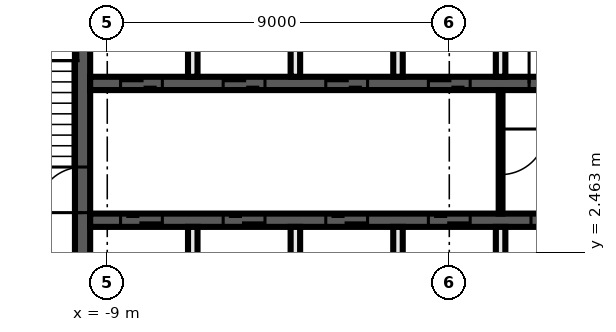
"""IFC4 building model, lengths in metres.
Left out: names, types, materials, properties, quantities, classifications, styles, units other than length and angle.
Written with IfcOpenShell. Run it as: python <this file> out.ifc"""

import sys

from ifc_helpers import new_model, si_unit, direction, frame, frame_2d, origin, place, context, subcontext, project, spatial, rectangle, extrude, element, fill, save


model = new_model("IFC4")
c1 = context("Model", 3, precision=1e-05, world=origin(), true_north=direction((0.0, 1.0)))
c2 = subcontext(c1, "Body", "Model", "MODEL_VIEW")
j1 = project(units=[si_unit("LENGTHUNIT", "METRE"), si_unit("PLANEANGLEUNIT", "RADIAN")], contexts=[c1])
p1 = place(None, origin())
s1 = spatial("IfcSite", under=j1, at=p1, CompositionType="ELEMENT")
p2 = place(p1, origin())
s2 = spatial("IfcBuilding", under=s1, at=p2, CompositionType="ELEMENT")
p3 = place(p2, frame((0.0, 0.0, 77.3)))
s3 = spatial("IfcBuildingStorey", under=s2, at=p3, CompositionType="ELEMENT", Elevation=77.3)
p4 = place(p3, frame((-9.65, 2.3, 0.0), z_axis=(0.0, 0.0, 1.0), x_axis=(0.0, 1.0, 0.0)))
e1 = element("IfcWall", 1, at=p4, inside=s3, PredefinedType="SHEAR", context=c2, shape_type="SweptSolid", body=[
    extrude(rectangle(XDim=7.5, YDim=0.4, at=frame_2d((3.75, 0.0))), origin(), (0.0, 0.0, 1.0), 3.3),
])
p5 = place(p4, frame((1.2, 0.0, 0.0)))
e2 = element("IfcOpeningElement", 2, at=p5, cuts=e1, PredefinedType="OPENING", context=c2, shape_type="SweptSolid", body=[
    extrude(rectangle(XDim=1.2, YDim=2.1, at=frame_2d((0.6, 1.05))), frame((0.0, 0.21, 0.0), z_axis=(0.0, -1.0, 0.0), x_axis=(1.0, 0.0, 0.0)), (0.0, 0.0, 1.0), 0.42),
])
p6 = place(p3, frame((-9.45, 6.9, 0.0), z_axis=(0.0, 0.0, 1.0), x_axis=(1.0, 0.0, 0.0)))
e3 = element("IfcWall", 3, at=p6, inside=s3, PredefinedType="SHEAR", context=c2, shape_type="SweptSolid", body=[
    extrude(rectangle(XDim=18.9, YDim=0.35, at=frame_2d((9.45, 0.0))), origin(), (0.0, 0.0, 1.0), 3.3),
])
p7 = place(p6, frame((0.8, 0.0, 0.0)))
e4 = element("IfcOpeningElement", 4, at=p7, cuts=e3, PredefinedType="OPENING", context=c2, shape_type="SweptSolid", body=[
    extrude(rectangle(XDim=1.1, YDim=2.1, at=frame_2d((0.55, 1.05))), frame((0.0, 0.185, 0.0), z_axis=(0.0, -1.0, 0.0), x_axis=(1.0, 0.0, 0.0)), (0.0, 0.0, 1.0), 0.37),
])
p8 = place(p6, frame((3.5, 0.0, 0.0)))
e5 = element("IfcOpeningElement", 5, at=p8, cuts=e3, PredefinedType="OPENING", context=c2, shape_type="SweptSolid", body=[
    extrude(rectangle(XDim=1.1, YDim=2.1, at=frame_2d((0.55, 1.05))), frame((0.0, 0.185, 0.0), z_axis=(0.0, -1.0, 0.0), x_axis=(1.0, 0.0, 0.0)), (0.0, 0.0, 1.0), 0.37),
])
p9 = place(p6, frame((6.2, 0.0, 0.0)))
e6 = element("IfcOpeningElement", 6, at=p9, cuts=e3, PredefinedType="OPENING", context=c2, shape_type="SweptSolid", body=[
    extrude(rectangle(XDim=1.1, YDim=2.1, at=frame_2d((0.55, 1.05))), frame((0.0, 0.185, 0.0), z_axis=(0.0, -1.0, 0.0), x_axis=(1.0, 0.0, 0.0)), (0.0, 0.0, 1.0), 0.37),
])
p10 = place(p6, frame((8.9, 0.0, 0.0)))
e7 = element("IfcOpeningElement", 7, at=p10, cuts=e3, PredefinedType="OPENING", context=c2, shape_type="SweptSolid", body=[
    extrude(rectangle(XDim=1.1, YDim=2.1, at=frame_2d((0.55, 1.05))), frame((0.0, 0.185, 0.0), z_axis=(0.0, -1.0, 0.0), x_axis=(1.0, 0.0, 0.0)), (0.0, 0.0, 1.0), 0.37),
])
p11 = place(p6, frame((11.55, 0.0, 0.0)))
e8 = element("IfcOpeningElement", 8, at=p11, cuts=e3, PredefinedType="OPENING", context=c2, shape_type="SweptSolid", body=[
    extrude(rectangle(XDim=1.2, YDim=2.1, at=frame_2d((0.6, 1.05))), frame((0.0, 0.185, 0.0), z_axis=(0.0, -1.0, 0.0), x_axis=(1.0, 0.0, 0.0)), (0.0, 0.0, 1.0), 0.37),
])
p12 = place(p6, frame((14.3, 0.0, 0.0)))
e9 = element("IfcOpeningElement", 9, at=p12, cuts=e3, PredefinedType="OPENING", context=c2, shape_type="SweptSolid", body=[
    extrude(rectangle(XDim=1.1, YDim=2.1, at=frame_2d((0.55, 1.05))), frame((0.0, 0.185, 0.0), z_axis=(0.0, -1.0, 0.0), x_axis=(1.0, 0.0, 0.0)), (0.0, 0.0, 1.0), 0.37),
])
p13 = place(p6, frame((17.0, 0.0, 0.0)))
e10 = element("IfcOpeningElement", 10, at=p13, cuts=e3, PredefinedType="OPENING", context=c2, shape_type="SweptSolid", body=[
    extrude(rectangle(XDim=1.1, YDim=2.1, at=frame_2d((0.55, 1.05))), frame((0.0, 0.185, 0.0), z_axis=(0.0, -1.0, 0.0), x_axis=(1.0, 0.0, 0.0)), (0.0, 0.0, 1.0), 0.37),
])
p14 = place(p3, frame((9.45, 3.3, 0.0), z_axis=(0.0, 0.0, 1.0), x_axis=(-1.0, 0.0, 0.0)))
e11 = element("IfcWall", 11, at=p14, inside=s3, PredefinedType="SHEAR", context=c2, shape_type="SweptSolid", body=[
    extrude(rectangle(XDim=18.9, YDim=0.35, at=frame_2d((9.45, 0.0))), origin(), (0.0, 0.0, 1.0), 3.3),
])
p15 = place(p14, frame((17.0, 0.0, 0.0)))
e12 = element("IfcOpeningElement", 12, at=p15, cuts=e11, PredefinedType="OPENING", context=c2, shape_type="SweptSolid", body=[
    extrude(rectangle(XDim=1.1, YDim=2.1, at=frame_2d((0.55, 1.05))), frame((0.0, 0.185, 0.0), z_axis=(0.0, -1.0, 0.0), x_axis=(1.0, 0.0, 0.0)), (0.0, 0.0, 1.0), 0.37),
])
p16 = place(p14, frame((14.3, 0.0, 0.0)))
e13 = element("IfcOpeningElement", 13, at=p16, cuts=e11, PredefinedType="OPENING", context=c2, shape_type="SweptSolid", body=[
    extrude(rectangle(XDim=1.1, YDim=2.1, at=frame_2d((0.55, 1.05))), frame((0.0, 0.185, 0.0), z_axis=(0.0, -1.0, 0.0), x_axis=(1.0, 0.0, 0.0)), (0.0, 0.0, 1.0), 0.37),
])
p17 = place(p14, frame((11.6, 0.0, 0.0)))
e14 = element("IfcOpeningElement", 14, at=p17, cuts=e11, PredefinedType="OPENING", context=c2, shape_type="SweptSolid", body=[
    extrude(rectangle(XDim=1.1, YDim=2.1, at=frame_2d((0.55, 1.05))), frame((0.0, 0.185, 0.0), z_axis=(0.0, -1.0, 0.0), x_axis=(1.0, 0.0, 0.0)), (0.0, 0.0, 1.0), 0.37),
])
p18 = place(p14, frame((8.9, 0.0, 0.0)))
e15 = element("IfcOpeningElement", 15, at=p18, cuts=e11, PredefinedType="OPENING", context=c2, shape_type="SweptSolid", body=[
    extrude(rectangle(XDim=1.1, YDim=2.1, at=frame_2d((0.55, 1.05))), frame((0.0, 0.185, 0.0), z_axis=(0.0, -1.0, 0.0), x_axis=(1.0, 0.0, 0.0)), (0.0, 0.0, 1.0), 0.37),
])
p19 = place(p14, frame((6.2, 0.0, 0.0)))
e16 = element("IfcOpeningElement", 16, at=p19, cuts=e11, PredefinedType="OPENING", context=c2, shape_type="SweptSolid", body=[
    extrude(rectangle(XDim=1.1, YDim=2.1, at=frame_2d((0.55, 1.05))), frame((0.0, 0.185, 0.0), z_axis=(0.0, -1.0, 0.0), x_axis=(1.0, 0.0, 0.0)), (0.0, 0.0, 1.0), 0.37),
])
p20 = place(p14, frame((3.5, 0.0, 0.0)))
e17 = element("IfcOpeningElement", 17, at=p20, cuts=e11, PredefinedType="OPENING", context=c2, shape_type="SweptSolid", body=[
    extrude(rectangle(XDim=1.1, YDim=2.1, at=frame_2d((0.55, 1.05))), frame((0.0, 0.185, 0.0), z_axis=(0.0, -1.0, 0.0), x_axis=(1.0, 0.0, 0.0)), (0.0, 0.0, 1.0), 0.37),
])
p21 = place(p14, frame((0.9, 0.0, 0.0)))
e18 = element("IfcOpeningElement", 18, at=p21, cuts=e11, PredefinedType="OPENING", context=c2, shape_type="SweptSolid", body=[
    extrude(rectangle(XDim=0.9, YDim=2.1, at=frame_2d((0.45, 1.05))), frame((0.0, 0.185, 0.0), z_axis=(0.0, -1.0, 0.0), x_axis=(1.0, 0.0, 0.0)), (0.0, 0.0, 1.0), 0.37),
])
p22 = place(p3, frame((1.35, 6.725, 0.0), z_axis=(0.0, 0.0, 1.0), x_axis=(0.0, -1.0, 0.0)))
e19 = element("IfcWall", 19, at=p22, inside=s3, PredefinedType="PARTITIONING", context=c2, shape_type="SweptSolid", body=[
    extrude(rectangle(XDim=3.25, YDim=0.1, at=frame_2d((1.625, 0.0))), origin(), (0.0, 0.0, 1.0), 3.3),
])
p23 = place(p22, frame((1.025, 0.0, 0.0)))
e20 = element("IfcOpeningElement", 20, at=p23, cuts=e19, PredefinedType="OPENING", context=c2, shape_type="SweptSolid", body=[
    extrude(rectangle(XDim=1.2, YDim=2.1, at=frame_2d((0.6, 1.05))), frame((0.0, 0.06, 0.0), z_axis=(0.0, -1.0, 0.0), x_axis=(1.0, 0.0, 0.0)), (0.0, 0.0, 1.0), 0.12),
])
for number, where, z_axis, x_axis in (
    (21, (1.35, 0.4, 0.0), (0.0, 0.0, 1.0), (0.0, 1.0, 0.0)),
    (22, (1.35, 7.075, 0.0), (0.0, 0.0, 1.0), (0.0, 1.0, 0.0)),
    (23, (-1.35, 0.4, 0.0), (0.0, 0.0, 1.0), (0.0, 1.0, 0.0)),
    (24, (-1.35, 7.075, 0.0), (0.0, 0.0, 1.0), (0.0, 1.0, 0.0)),
    (25, (-4.05, 0.4, 0.0), (0.0, 0.0, 1.0), (0.0, 1.0, 0.0)),
    (26, (-4.05, 7.075, 0.0), (0.0, 0.0, 1.0), (0.0, 1.0, 0.0)),
    (27, (-6.75, 0.4, 0.0), (0.0, 0.0, 1.0), (0.0, 1.0, 0.0)),
    (28, (-6.75, 7.075, 0.0), (0.0, 0.0, 1.0), (0.0, 1.0, 0.0)),
):
    element("IfcWall", number, at=place(p3, frame(where, z_axis=z_axis, x_axis=x_axis)), inside=s3, PredefinedType="SOLIDWALL", context=c2, shape_type="SweptSolid", body=[
        extrude(rectangle(XDim=2.725, YDim=0.25, at=frame_2d((1.363, 0.0))), origin(), (0.0, 0.0, 1.0), 3.3),
    ])
p24 = place(p7, origin())
e29 = element("IfcDoor", 29, at=p24, inside=s3, OperationType="DOUBLE_DOOR_SLIDING", PredefinedType="DOOR", context=c2, shape_type="SweptSolid", body=[
    extrude(rectangle(XDim=1.1, YDim=2.1, at=frame_2d((0.55, 1.05))), frame((0.0, 0.025, 0.0), z_axis=(0.0, -1.0, 0.0), x_axis=(1.0, 0.0, 0.0)), (0.0, 0.0, 1.0), 0.05),
])
fill(e4, e29)
p25 = place(p8, origin())
e30 = element("IfcDoor", 30, at=p25, inside=s3, OperationType="DOUBLE_DOOR_SLIDING", PredefinedType="DOOR", context=c2, shape_type="SweptSolid", body=[
    extrude(rectangle(XDim=1.1, YDim=2.1, at=frame_2d((0.55, 1.05))), frame((0.0, 0.025, 0.0), z_axis=(0.0, -1.0, 0.0), x_axis=(1.0, 0.0, 0.0)), (0.0, 0.0, 1.0), 0.05),
])
fill(e5, e30)
p26 = place(p9, origin())
e31 = element("IfcDoor", 31, at=p26, inside=s3, OperationType="DOUBLE_DOOR_SLIDING", PredefinedType="DOOR", context=c2, shape_type="SweptSolid", body=[
    extrude(rectangle(XDim=1.1, YDim=2.1, at=frame_2d((0.55, 1.05))), frame((0.0, 0.025, 0.0), z_axis=(0.0, -1.0, 0.0), x_axis=(1.0, 0.0, 0.0)), (0.0, 0.0, 1.0), 0.05),
])
fill(e6, e31)
p27 = place(p10, origin())
e32 = element("IfcDoor", 32, at=p27, inside=s3, OperationType="DOUBLE_DOOR_SLIDING", PredefinedType="DOOR", context=c2, shape_type="SweptSolid", body=[
    extrude(rectangle(XDim=1.1, YDim=2.1, at=frame_2d((0.55, 1.05))), frame((0.0, 0.025, 0.0), z_axis=(0.0, -1.0, 0.0), x_axis=(1.0, 0.0, 0.0)), (0.0, 0.0, 1.0), 0.05),
])
fill(e7, e32)
p28 = place(p11, origin())
e33 = element("IfcDoor", 33, at=p28, inside=s3, OperationType="SINGLE_SWING_LEFT", PredefinedType="DOOR", context=c2, shape_type="SweptSolid", body=[
    extrude(rectangle(XDim=1.2, YDim=2.1, at=frame_2d((0.6, 1.05))), frame((0.0, 0.025, 0.0), z_axis=(0.0, -1.0, 0.0), x_axis=(1.0, 0.0, 0.0)), (0.0, 0.0, 1.0), 0.05),
])
fill(e8, e33)
p29 = place(p15, origin())
e34 = element("IfcDoor", 34, at=p29, inside=s3, OperationType="DOUBLE_DOOR_SLIDING", PredefinedType="DOOR", context=c2, shape_type="SweptSolid", body=[
    extrude(rectangle(XDim=1.1, YDim=2.1, at=frame_2d((0.55, 1.05))), frame((0.0, 0.025, 0.0), z_axis=(0.0, -1.0, 0.0), x_axis=(1.0, 0.0, 0.0)), (0.0, 0.0, 1.0), 0.05),
])
fill(e12, e34)
p30 = place(p16, origin())
e35 = element("IfcDoor", 35, at=p30, inside=s3, OperationType="DOUBLE_DOOR_SLIDING", PredefinedType="DOOR", context=c2, shape_type="SweptSolid", body=[
    extrude(rectangle(XDim=1.1, YDim=2.1, at=frame_2d((0.55, 1.05))), frame((0.0, 0.025, 0.0), z_axis=(0.0, -1.0, 0.0), x_axis=(1.0, 0.0, 0.0)), (0.0, 0.0, 1.0), 0.05),
])
fill(e13, e35)
p31 = place(p17, origin())
e36 = element("IfcDoor", 36, at=p31, inside=s3, OperationType="DOUBLE_DOOR_SLIDING", PredefinedType="DOOR", context=c2, shape_type="SweptSolid", body=[
    extrude(rectangle(XDim=1.1, YDim=2.1, at=frame_2d((0.55, 1.05))), frame((0.0, 0.025, 0.0), z_axis=(0.0, -1.0, 0.0), x_axis=(1.0, 0.0, 0.0)), (0.0, 0.0, 1.0), 0.05),
])
fill(e14, e36)
p32 = place(p18, origin())
e37 = element("IfcDoor", 37, at=p32, inside=s3, OperationType="DOUBLE_DOOR_SLIDING", PredefinedType="DOOR", context=c2, shape_type="SweptSolid", body=[
    extrude(rectangle(XDim=1.1, YDim=2.1, at=frame_2d((0.55, 1.05))), frame((0.0, 0.025, 0.0), z_axis=(0.0, -1.0, 0.0), x_axis=(1.0, 0.0, 0.0)), (0.0, 0.0, 1.0), 0.05),
])
fill(e15, e37)
p33 = place(p19, origin())
e38 = element("IfcDoor", 38, at=p33, inside=s3, OperationType="DOUBLE_DOOR_SLIDING", PredefinedType="DOOR", context=c2, shape_type="SweptSolid", body=[
    extrude(rectangle(XDim=1.1, YDim=2.1, at=frame_2d((0.55, 1.05))), frame((0.0, 0.025, 0.0), z_axis=(0.0, -1.0, 0.0), x_axis=(1.0, 0.0, 0.0)), (0.0, 0.0, 1.0), 0.05),
])
fill(e16, e38)
p34 = place(p5, origin())
e39 = element("IfcDoor", 39, at=p34, inside=s3, OperationType="SINGLE_SWING_RIGHT", PredefinedType="DOOR", context=c2, shape_type="SweptSolid", body=[
    extrude(rectangle(XDim=1.2, YDim=2.1, at=frame_2d((0.6, 1.05))), frame((0.0, 0.025, 0.0), z_axis=(0.0, -1.0, 0.0), x_axis=(1.0, 0.0, 0.0)), (0.0, 0.0, 1.0), 0.05),
])
fill(e2, e39)
p35 = place(p23, origin())
e40 = element("IfcDoor", 40, at=p35, inside=s3, OperationType="SINGLE_SWING_LEFT", PredefinedType="DOOR", context=c2, shape_type="SweptSolid", body=[
    extrude(rectangle(XDim=1.2, YDim=2.1, at=frame_2d((0.6, 1.05))), frame((0.0, 0.025, 0.0), z_axis=(0.0, -1.0, 0.0), x_axis=(1.0, 0.0, 0.0)), (0.0, 0.0, 1.0), 0.05),
])
fill(e20, e40)
save(model, sys.argv[1])
